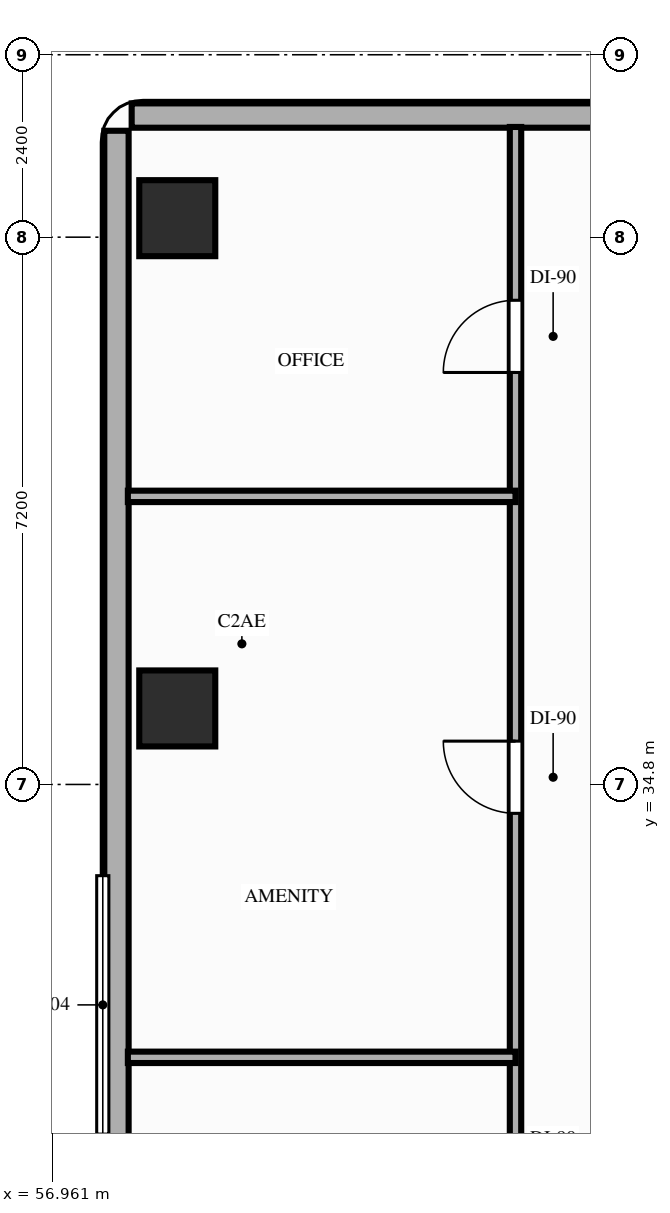
"""IFC4 building model, lengths in metres.
Left out: names, types, materials, properties, quantities, classifications, styles, units other than length and angle.
Written with IfcOpenShell. Run it as: python <this file> out.ifc"""

import sys

from ifc_helpers import new_model, si_unit, direction, frame, frame_2d, origin, origin_2d, place, context, subcontext, project, spatial, rectangle, extrude, element, fill, save


model = new_model("IFC4")
c1 = context("Model", 3, precision=1e-05, world=origin(), true_north=direction((0.0, 1.0)))
c2 = subcontext(c1, "Body", "Model", "MODEL_VIEW")
j1 = project(units=[si_unit("LENGTHUNIT", "METRE"), si_unit("PLANEANGLEUNIT", "RADIAN")], contexts=[c1])
p1 = place(None, origin())
s1 = spatial("IfcSite", under=j1, at=p1, CompositionType="ELEMENT")
p2 = place(p1, origin())
s2 = spatial("IfcBuilding", under=s1, at=p2, CompositionType="ELEMENT")
p3 = place(p2, frame((0.0, 0.0, 53.2)))
s3 = spatial("IfcBuildingStorey", under=s2, at=p3, CompositionType="ELEMENT", Elevation=53.2)
for number, where, z_axis, x_axis in (
    (1, (58.6, 35.8, 0.0), (0.0, 0.0, 1.0), (1.0, 0.0, 0.0)),
    (2, (58.6, 42.25, 0.0), (0.0, 0.0, 1.0), (1.0, 0.0, 0.0)),
):
    element("IfcColumn", number, at=place(p3, frame(where, z_axis=z_axis, x_axis=x_axis)), inside=s3, PredefinedType="COLUMN", context=c2, shape_type="SweptSolid", body=[
        extrude(rectangle(XDim=1.0, YDim=1.0, at=origin_2d()), origin(), (0.0, 0.0, 1.0), 3.2),
    ])
p4 = place(p3, frame((57.8, 43.4, 0.0), z_axis=(0.0, 0.0, 1.0), x_axis=(0.0, -1.0, 0.0)))
e3 = element("IfcWall", 3, at=p4, inside=s3, PredefinedType="STANDARD", context=c2, shape_type="SweptSolid", body=[
    extrude(rectangle(XDim=22.6, YDim=0.32, at=frame_2d((11.3, 0.0))), origin(), (0.0, 0.0, 1.0), 2.5),
])
p5 = place(p3, frame((72.8, 43.6, 0.0), z_axis=(0.0, 0.0, 1.0), x_axis=(-1.0, 0.0, 0.0)))
e4 = element("IfcWall", 4, at=p5, inside=s3, PredefinedType="STANDARD", context=c2, shape_type="SweptSolid", body=[
    extrude(rectangle(XDim=14.8, YDim=0.32, at=frame_2d((7.4, 0.0))), origin(), (0.0, 0.0, 1.0), 3.02),
])
p6 = place(p3, frame((63.05, 20.75, 0.0), z_axis=(0.0, 0.0, 1.0), x_axis=(0.0, 1.0, 0.0)))
e5 = element("IfcWall", 5, at=p6, inside=s3, PredefinedType="PARTITIONING", context=c2, shape_type="SweptSolid", body=[
    extrude(rectangle(XDim=22.7, YDim=0.15, at=frame_2d((11.35, 0.0))), origin(), (0.0, 0.0, 1.0), 2.5),
])
p7 = place(p6, frame((0.73, 0.0, 0.0)))
e6 = element("IfcOpeningElement", 6, at=p7, cuts=e5, PredefinedType="OPENING", context=c2, shape_type="SweptSolid", body=[
    extrude(rectangle(XDim=0.85, YDim=2.1, at=frame_2d((0.425, 1.05))), frame((0.0, 0.085, 0.0), z_axis=(0.0, -1.0, 0.0), x_axis=(1.0, 0.0, 0.0)), (0.0, 0.0, 1.0), 0.17),
])
p8 = place(p6, frame((3.43, 0.0, 0.0)))
e7 = element("IfcOpeningElement", 7, at=p8, cuts=e5, PredefinedType="OPENING", context=c2, shape_type="SweptSolid", body=[
    extrude(rectangle(XDim=0.95, YDim=2.1, at=frame_2d((0.475, 1.05))), frame((0.0, 0.085, 0.0), z_axis=(0.0, -1.0, 0.0), x_axis=(1.0, 0.0, 0.0)), (0.0, 0.0, 1.0), 0.17),
])
p9 = place(p6, frame((8.15, 0.0, 0.0)))
e8 = element("IfcOpeningElement", 8, at=p9, cuts=e5, PredefinedType="OPENING", context=c2, shape_type="SweptSolid", body=[
    extrude(rectangle(XDim=0.95, YDim=2.15, at=frame_2d((0.475, 1.075))), frame((0.0, 0.085, 0.0), z_axis=(0.0, -1.0, 0.0), x_axis=(1.0, 0.0, 0.0)), (0.0, 0.0, 1.0), 0.17),
])
p10 = place(p6, frame((13.67, 0.0, 0.0)))
e9 = element("IfcOpeningElement", 9, at=p10, cuts=e5, PredefinedType="OPENING", context=c2, shape_type="SweptSolid", body=[
    extrude(rectangle(XDim=0.95, YDim=2.15, at=frame_2d((0.475, 1.075))), frame((0.0, 0.085, 0.0), z_axis=(0.0, -1.0, 0.0), x_axis=(1.0, 0.0, 0.0)), (0.0, 0.0, 1.0), 0.17),
])
p11 = place(p6, frame((19.47, 0.0, 0.0)))
e10 = element("IfcOpeningElement", 10, at=p11, cuts=e5, PredefinedType="OPENING", context=c2, shape_type="SweptSolid", body=[
    extrude(rectangle(XDim=0.95, YDim=2.15, at=frame_2d((0.475, 1.075))), frame((0.0, 0.085, 0.0), z_axis=(0.0, -1.0, 0.0), x_axis=(1.0, 0.0, 0.0)), (0.0, 0.0, 1.0), 0.17),
])
for number, where, z_axis, x_axis in (
    (11, (57.95, 31.21, 0.0), (0.0, 0.0, 1.0), (1.0, 0.0, 0.0)),
    (12, (57.95, 38.59, 0.0), (0.0, 0.0, 1.0), (1.0, 0.0, 0.0)),
):
    element("IfcWall", number, at=place(p3, frame(where, z_axis=z_axis, x_axis=x_axis)), inside=s3, PredefinedType="PARTITIONING", context=c2, shape_type="SweptSolid", body=[
        extrude(rectangle(XDim=5.1, YDim=0.15, at=frame_2d((2.55, 0.0))), origin(), (0.0, 0.0, 1.0), 2.5),
    ])
p12 = place(p10, origin())
e13 = element("IfcDoor", 13, at=p12, inside=s3, OperationType="SINGLE_SWING_RIGHT", PredefinedType="DOOR", context=c2, shape_type="SweptSolid", body=[
    extrude(rectangle(XDim=0.95, YDim=2.15, at=frame_2d((0.475, 1.075))), frame((0.0, 0.025, 0.0), z_axis=(0.0, -1.0, 0.0), x_axis=(1.0, 0.0, 0.0)), (0.0, 0.0, 1.0), 0.05),
])
fill(e9, e13)
p13 = place(p11, origin())
e14 = element("IfcDoor", 14, at=p13, inside=s3, OperationType="SINGLE_SWING_LEFT", PredefinedType="DOOR", context=c2, shape_type="SweptSolid", body=[
    extrude(rectangle(XDim=0.95, YDim=2.15, at=frame_2d((0.475, 1.075))), frame((0.0, 0.025, 0.0), z_axis=(0.0, -1.0, 0.0), x_axis=(1.0, 0.0, 0.0)), (0.0, 0.0, 1.0), 0.05),
])
fill(e10, e14)
save(model, sys.argv[1])
